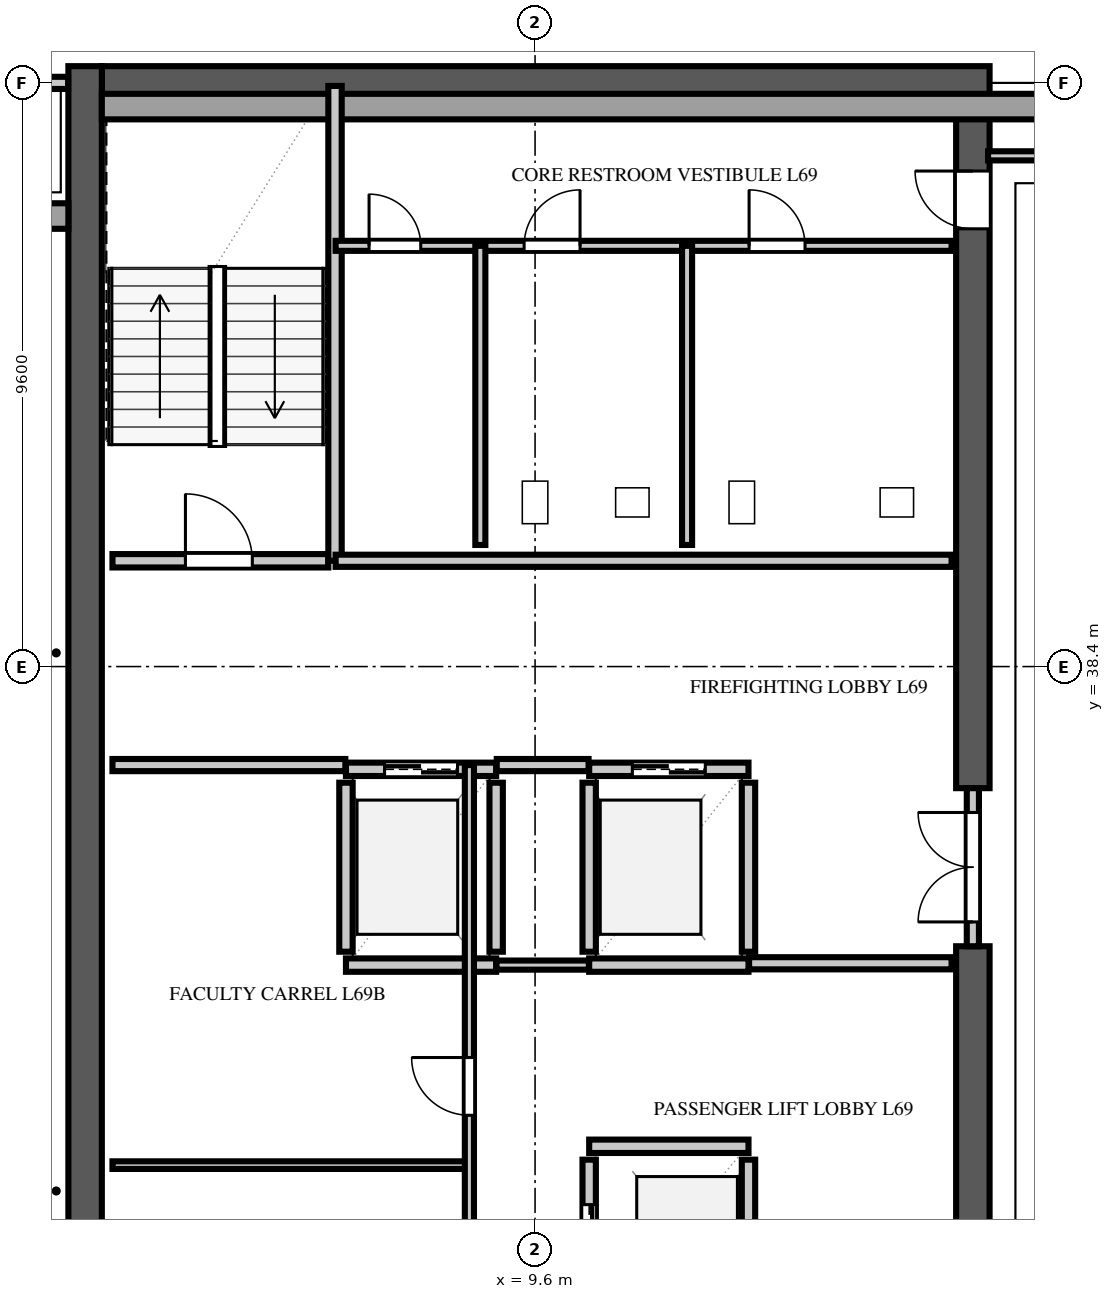
"""IFC4 building model, lengths in metres.
Left out: names, types, materials, properties, quantities, classifications, styles, units other than length and angle.
Written with IfcOpenShell. Run it as: python <this file> out.ifc"""

import sys

from ifc_helpers import new_model, si_unit, direction, frame, frame_2d, origin, place, context, subcontext, project, spatial, rectangle, extrude, element, fill, save


model = new_model("IFC4")
c1 = context("Model", 3, precision=1e-05, world=origin(), true_north=direction((0.0, 1.0)))
c2 = subcontext(c1, "Body", "Model", "MODEL_VIEW")
j1 = project(units=[si_unit("LENGTHUNIT", "METRE"), si_unit("PLANEANGLEUNIT", "RADIAN")], contexts=[c1])
p1 = place(None, origin())
s1 = spatial("IfcSite", under=j1, at=p1, CompositionType="ELEMENT")
p2 = place(p1, origin())
s2 = spatial("IfcBuilding", under=s1, at=p2, CompositionType="ELEMENT")
p3 = place(p2, frame((0.0, 0.0, 273.4)))
s3 = spatial("IfcBuildingStorey", under=s2, at=p3, CompositionType="ELEMENT", Elevation=273.4)
p4 = place(p3, frame((2.475, 48.0, 0.0), z_axis=(0.0, 0.0, 1.0), x_axis=(1.0, 0.0, 0.0)))
e1 = element("IfcWall", 1, at=p4, inside=s3, PredefinedType="SHEAR", context=c2, shape_type="SweptSolid", body=[
    extrude(rectangle(XDim=14.6, YDim=0.55, at=frame_2d((7.3, 0.0))), origin(), (0.0, 0.0, 1.0), 3.54),
])
p5 = place(p3, frame((2.2, 9.325, 0.0), z_axis=(0.0, 0.0, 1.0), x_axis=(0.0, 1.0, 0.0)))
e2 = element("IfcWall", 2, at=p5, inside=s3, PredefinedType="SHEAR", context=c2, shape_type="SweptSolid", body=[
    extrude(rectangle(XDim=38.95, YDim=0.55, at=frame_2d((19.475, 0.0))), origin(), (0.0, 0.0, 1.0), 3.54),
])
p6 = place(p3, frame((16.8, 26.0, 0.0), z_axis=(0.0, 0.0, 1.0), x_axis=(0.0, 1.0, 0.0)))
e3 = element("IfcWall", 3, at=p6, inside=s3, PredefinedType="SHEAR", context=c2, shape_type="SweptSolid", body=[
    extrude(rectangle(XDim=7.8, YDim=0.55, at=frame_2d((3.9, 0.0))), origin(), (0.0, 0.0, 1.0), 3.54),
])
p7 = place(p3, frame((16.8, 36.4, 0.0), z_axis=(0.0, 0.0, 1.0), x_axis=(0.0, 1.0, 0.0)))
e4 = element("IfcWall", 4, at=p7, inside=s3, PredefinedType="SHEAR", context=c2, shape_type="SweptSolid", body=[
    extrude(rectangle(XDim=11.325, YDim=0.55, at=frame_2d((5.663, 0.0))), origin(), (0.0, 0.0, 1.0), 3.54),
])
p8 = place(p7, frame((9.2, 0.0, 0.0)))
e5 = element("IfcOpeningElement", 5, at=p8, cuts=e4, PredefinedType="OPENING", context=c2, shape_type="SweptSolid", body=[
    extrude(rectangle(XDim=0.95, YDim=2.15, at=frame_2d((0.475, 1.075))), frame((0.0, 0.287, 0.0), z_axis=(0.0, -1.0, 0.0), x_axis=(1.0, 0.0, 0.0)), (0.0, 0.0, 1.0), 0.574),
])
p9 = place(p3, frame((36.56, 47.61, 0.0), z_axis=(0.0, 0.0, 1.0), x_axis=(-1.0, 0.0, 0.0)))
e6 = element("IfcWall", 6, at=p9, inside=s3, PredefinedType="SOLIDWALL", context=c2, shape_type="SweptSolid", body=[
    extrude(rectangle(XDim=34.085, YDim=0.42, at=frame_2d((17.042, 0.0))), origin(), (0.0, 0.0, 1.0), 3.54),
])
p10 = place(p9, frame((4.885, 0.0, 0.9)))
e7 = element("IfcOpeningElement", 7, at=p10, cuts=e6, PredefinedType="OPENING", context=c2, shape_type="SweptSolid", body=[
    extrude(rectangle(XDim=0.95, YDim=1.85, at=frame_2d((0.475, 0.925))), frame((0.0, 0.222, 0.0), z_axis=(0.0, -1.0, 0.0), x_axis=(1.0, 0.0, 0.0)), (0.0, 0.0, 1.0), 0.444),
])
p11 = place(p9, frame((9.41, 0.0, 0.9)))
e8 = element("IfcOpeningElement", 8, at=p11, cuts=e6, PredefinedType="OPENING", context=c2, shape_type="SweptSolid", body=[
    extrude(rectangle(XDim=1.5, YDim=1.85, at=frame_2d((0.75, 0.925))), frame((0.0, 0.222, 0.0), z_axis=(0.0, -1.0, 0.0), x_axis=(1.0, 0.0, 0.0)), (0.0, 0.0, 1.0), 0.444),
])
p12 = place(p9, frame((14.485, 0.0, 0.9)))
e9 = element("IfcOpeningElement", 9, at=p12, cuts=e6, PredefinedType="OPENING", context=c2, shape_type="SweptSolid", body=[
    extrude(rectangle(XDim=0.95, YDim=1.85, at=frame_2d((0.475, 0.925))), frame((0.0, 0.222, 0.0), z_axis=(0.0, -1.0, 0.0), x_axis=(1.0, 0.0, 0.0)), (0.0, 0.0, 1.0), 0.444),
])
p13 = place(p3, frame((1.925, 45.81, 0.0), z_axis=(0.0, 0.0, 1.0), x_axis=(-1.0, 0.0, 0.0)))
e10 = element("IfcWall", 10, at=p13, inside=s3, PredefinedType="SOLIDWALL", context=c2, shape_type="SweptSolid", body=[
    extrude(rectangle(XDim=1.885, YDim=0.42, at=frame_2d((0.942, 0.0))), origin(), (0.0, 0.0, 1.0), 3.54),
])
p14 = place(p3, frame((2.65, 40.14, 0.0), z_axis=(0.0, 0.0, 1.0), x_axis=(1.0, 0.0, 0.0)))
e11 = element("IfcWall", 11, at=p14, inside=s3, PredefinedType="SOLIDWALL", context=c2, shape_type="SweptSolid", body=[
    extrude(rectangle(XDim=3.55, YDim=0.22, at=frame_2d((1.775, 0.0))), origin(), (0.0, 0.0, 1.0), 3.54),
])
p15 = place(p14, frame((1.2, 0.0, 0.0)))
e12 = element("IfcOpeningElement", 12, at=p15, cuts=e11, PredefinedType="OPENING", context=c2, shape_type="SweptSolid", body=[
    extrude(rectangle(XDim=1.1, YDim=2.2, at=frame_2d((0.55, 1.1))), frame((0.0, 0.122, 0.0), z_axis=(0.0, -1.0, 0.0), x_axis=(1.0, 0.0, 0.0)), (0.0, 0.0, 1.0), 0.244),
])
p16 = place(p3, frame((6.31, 40.14, 0.0), z_axis=(0.0, 0.0, 1.0), x_axis=(0.0, 1.0, 0.0)))
e13 = element("IfcWall", 13, at=p16, inside=s3, PredefinedType="SOLIDWALL", context=c2, shape_type="SweptSolid", body=[
    extrude(rectangle(XDim=7.81, YDim=0.22, at=frame_2d((3.905, 0.0))), origin(), (0.0, 0.0, 1.0), 3.54),
])
p17 = place(p3, frame((10.49, 27.71, 0.0), z_axis=(0.0, 0.0, 1.0), x_axis=(0.0, 1.0, 0.0)))
e14 = element("IfcWall", 14, at=p17, inside=s3, PredefinedType="SOLIDWALL", context=c2, shape_type="SweptSolid", body=[
    extrude(rectangle(XDim=2.58, YDim=0.22, at=frame_2d((1.29, 0.0))), origin(), (0.0, 0.0, 1.0), 3.54),
])
p18 = place(p17, frame((0.74, 0.0, 0.0)))
e15 = element("IfcOpeningElement", 15, at=p18, cuts=e14, PredefinedType="OPENING", context=c2, shape_type="SweptSolid", body=[
    extrude(rectangle(XDim=1.1, YDim=2.2, at=frame_2d((0.55, 1.1))), frame((0.0, 0.122, 0.0), z_axis=(0.0, -1.0, 0.0), x_axis=(1.0, 0.0, 0.0)), (0.0, 0.0, 1.0), 0.244),
])
p19 = place(p3, frame((13.11, 27.71, 0.0), z_axis=(0.0, 0.0, 1.0), x_axis=(0.0, 1.0, 0.0)))
e16 = element("IfcWall", 16, at=p19, inside=s3, PredefinedType="SOLIDWALL", context=c2, shape_type="SweptSolid", body=[
    extrude(rectangle(XDim=2.58, YDim=0.22, at=frame_2d((1.29, 0.0))), origin(), (0.0, 0.0, 1.0), 3.54),
])
p20 = place(p3, frame((10.49, 30.51, 0.0), z_axis=(0.0, 0.0, 1.0), x_axis=(1.0, 0.0, 0.0)))
e17 = element("IfcWall", 17, at=p20, inside=s3, PredefinedType="SOLIDWALL", context=c2, shape_type="SweptSolid", body=[
    extrude(rectangle(XDim=2.62, YDim=0.22, at=frame_2d((1.31, 0.0))), origin(), (0.0, 0.0, 1.0), 3.54),
])
for number, where, z_axis, x_axis in (
    (18, (6.49, 33.71, 0.0), (0.0, 0.0, 1.0), (0.0, 1.0, 0.0)),
    (19, (8.96, 33.71, 0.0), (0.0, 0.0, 1.0), (0.0, 1.0, 0.0)),
):
    element("IfcWall", number, at=place(p3, frame(where, z_axis=z_axis, x_axis=x_axis)), inside=s3, PredefinedType="SOLIDWALL", context=c2, shape_type="SweptSolid", body=[
        extrude(rectangle(XDim=2.78, YDim=0.22, at=frame_2d((1.39, 0.0))), origin(), (0.0, 0.0, 1.0), 3.54),
    ])
p21 = place(p3, frame((6.49, 33.49, 0.0), z_axis=(0.0, 0.0, 1.0), x_axis=(1.0, 0.0, 0.0)))
e20 = element("IfcWall", 20, at=p21, inside=s3, PredefinedType="SOLIDWALL", context=c2, shape_type="SweptSolid", body=[
    extrude(rectangle(XDim=2.47, YDim=0.22, at=frame_2d((1.235, 0.0))), origin(), (0.0, 0.0, 1.0), 3.54),
])
p22 = place(p3, frame((6.49, 36.71, 0.0), z_axis=(0.0, 0.0, 1.0), x_axis=(1.0, 0.0, 0.0)))
e21 = element("IfcWall", 21, at=p22, inside=s3, PredefinedType="SOLIDWALL", context=c2, shape_type="SweptSolid", body=[
    extrude(rectangle(XDim=2.47, YDim=0.22, at=frame_2d((1.235, 0.0))), origin(), (0.0, 0.0, 1.0), 3.54),
])
p23 = place(p22, frame((0.635, 0.0, 0.0)))
e22 = element("IfcOpeningElement", 22, at=p23, cuts=e21, PredefinedType="OPENING", context=c2, shape_type="SweptSolid", body=[
    extrude(rectangle(XDim=1.2, YDim=2.2, at=frame_2d((0.6, 1.1))), frame((0.0, 0.122, 0.0), z_axis=(0.0, -1.0, 0.0), x_axis=(1.0, 0.0, 0.0)), (0.0, 0.0, 1.0), 0.244),
])
for number, where, z_axis, x_axis in (
    (23, (10.49, 33.71, 0.0), (0.0, 0.0, 1.0), (0.0, 1.0, 0.0)),
    (24, (13.11, 33.71, 0.0), (0.0, 0.0, 1.0), (0.0, 1.0, 0.0)),
):
    element("IfcWall", number, at=place(p3, frame(where, z_axis=z_axis, x_axis=x_axis)), inside=s3, PredefinedType="SOLIDWALL", context=c2, shape_type="SweptSolid", body=[
        extrude(rectangle(XDim=2.78, YDim=0.22, at=frame_2d((1.39, 0.0))), origin(), (0.0, 0.0, 1.0), 3.54),
    ])
p24 = place(p3, frame((10.49, 33.49, 0.0), z_axis=(0.0, 0.0, 1.0), x_axis=(1.0, 0.0, 0.0)))
e25 = element("IfcWall", 25, at=p24, inside=s3, PredefinedType="SOLIDWALL", context=c2, shape_type="SweptSolid", body=[
    extrude(rectangle(XDim=2.62, YDim=0.22, at=frame_2d((1.31, 0.0))), origin(), (0.0, 0.0, 1.0), 3.54),
])
p25 = place(p3, frame((10.49, 36.71, 0.0), z_axis=(0.0, 0.0, 1.0), x_axis=(1.0, 0.0, 0.0)))
e26 = element("IfcWall", 26, at=p25, inside=s3, PredefinedType="SOLIDWALL", context=c2, shape_type="SweptSolid", body=[
    extrude(rectangle(XDim=2.62, YDim=0.22, at=frame_2d((1.31, 0.0))), origin(), (0.0, 0.0, 1.0), 3.54),
])
p26 = place(p25, frame((0.71, 0.0, 0.0)))
e27 = element("IfcOpeningElement", 27, at=p26, cuts=e26, PredefinedType="OPENING", context=c2, shape_type="SweptSolid", body=[
    extrude(rectangle(XDim=1.2, YDim=2.2, at=frame_2d((0.6, 1.1))), frame((0.0, 0.122, 0.0), z_axis=(0.0, -1.0, 0.0), x_axis=(1.0, 0.0, 0.0)), (0.0, 0.0, 1.0), 0.244),
])
p27 = place(p3, frame((2.65, 36.78, 0.0), z_axis=(0.0, 0.0, 1.0), x_axis=(1.0, 0.0, 0.0)))
e28 = element("IfcWall", 28, at=p27, inside=s3, PredefinedType="SOLIDWALL", context=c2, shape_type="SweptSolid", body=[
    extrude(rectangle(XDim=3.83, YDim=0.2, at=frame_2d((1.915, 0.0))), origin(), (0.0, 0.0, 1.0), 3.54),
])
p28 = place(p3, frame((8.97, 36.78, 0.0), z_axis=(0.0, 0.0, 1.0), x_axis=(1.0, 0.0, 0.0)))
e29 = element("IfcWall", 29, at=p28, inside=s3, PredefinedType="SOLIDWALL", context=c2, shape_type="SweptSolid", body=[
    extrude(rectangle(XDim=1.51, YDim=0.2, at=frame_2d((0.755, 0.0))), origin(), (0.0, 0.0, 1.0), 3.54),
])
p29 = place(p3, frame((13.12, 33.52, 0.0), z_axis=(0.0, 0.0, 1.0), x_axis=(1.0, 0.0, 0.0)))
e30 = element("IfcWall", 30, at=p29, inside=s3, PredefinedType="SOLIDWALL", context=c2, shape_type="SweptSolid", body=[
    extrude(rectangle(XDim=3.33, YDim=0.2, at=frame_2d((1.665, 0.0))), origin(), (0.0, 0.0, 1.0), 3.54),
])
p30 = place(p3, frame((6.32, 40.14, 0.0), z_axis=(0.0, 0.0, 1.0), x_axis=(1.0, 0.0, 0.0)))
e31 = element("IfcWall", 31, at=p30, inside=s3, PredefinedType="SOLIDWALL", context=c2, shape_type="SweptSolid", body=[
    extrude(rectangle(XDim=10.13, YDim=0.2, at=frame_2d((5.065, 0.0))), origin(), (0.0, 0.0, 1.0), 3.54),
])
p31 = place(p3, frame((16.8, 33.8, 0.0), z_axis=(0.0, 0.0, 1.0), x_axis=(0.0, 1.0, 0.0)))
e32 = element("IfcWall", 32, at=p31, inside=s3, PredefinedType="SOLIDWALL", context=c2, shape_type="SweptSolid", body=[
    extrude(rectangle(XDim=2.6, YDim=0.2, at=frame_2d((1.3, 0.0))), origin(), (0.0, 0.0, 1.0), 3.54),
])
p32 = place(p31, frame((0.4, 0.0, 0.0)))
e33 = element("IfcOpeningElement", 33, at=p32, cuts=e32, PredefinedType="OPENING", context=c2, shape_type="SweptSolid", body=[
    extrude(rectangle(XDim=1.8, YDim=2.2, at=frame_2d((0.9, 1.1))), frame((0.0, 0.112, 0.0), z_axis=(0.0, -1.0, 0.0), x_axis=(1.0, 0.0, 0.0)), (0.0, 0.0, 1.0), 0.224),
])
p33 = place(p3, frame((8.965, 33.49, 0.0), z_axis=(0.0, 0.0, 1.0), x_axis=(1.0, 0.0, 0.0)))
e34 = element("IfcWall", 34, at=p33, inside=s3, PredefinedType="PARTITIONING", context=c2, shape_type="SweptSolid", body=[
    extrude(rectangle(XDim=1.52, YDim=0.15, at=frame_2d((0.76, 0.0))), origin(), (0.0, 0.0, 1.0), 3.54),
])
p34 = place(p3, frame((2.65, 30.2, 0.0), z_axis=(0.0, 0.0, 1.0), x_axis=(1.0, 0.0, 0.0)))
e35 = element("IfcWall", 35, at=p34, inside=s3, PredefinedType="PARTITIONING", context=c2, shape_type="SweptSolid", body=[
    extrude(rectangle(XDim=5.87, YDim=0.125, at=frame_2d((2.935, 0.0))), origin(), (0.0, 0.0, 1.0), 3.54),
])
p35 = place(p3, frame((8.52, 12.02, 0.0), z_axis=(0.0, 0.0, 1.0), x_axis=(0.0, 1.0, 0.0)))
e36 = element("IfcWall", 36, at=p35, inside=s3, PredefinedType="PARTITIONING", context=c2, shape_type="SweptSolid", body=[
    extrude(rectangle(XDim=24.76, YDim=0.15, at=frame_2d((12.38, 0.0))), origin(), (0.0, 0.0, 1.0), 3.54),
])
p36 = place(p35, frame((8.0, 0.0, 0.0)))
e37 = element("IfcOpeningElement", 37, at=p36, cuts=e36, PredefinedType="OPENING", context=c2, shape_type="SweptSolid", body=[
    extrude(rectangle(XDim=0.95, YDim=2.15, at=frame_2d((0.475, 1.075))), frame((0.0, 0.087, 0.0), z_axis=(0.0, -1.0, 0.0), x_axis=(1.0, 0.0, 0.0)), (0.0, 0.0, 1.0), 0.174),
])
p37 = place(p35, frame((19.0, 0.0, 0.0)))
e38 = element("IfcOpeningElement", 38, at=p37, cuts=e36, PredefinedType="OPENING", context=c2, shape_type="SweptSolid", body=[
    extrude(rectangle(XDim=0.95, YDim=2.15, at=frame_2d((0.475, 1.075))), frame((0.0, 0.087, 0.0), z_axis=(0.0, -1.0, 0.0), x_axis=(1.0, 0.0, 0.0)), (0.0, 0.0, 1.0), 0.174),
])
p38 = place(p3, frame((6.32, 45.32, 0.0), z_axis=(0.0, 0.0, 1.0), x_axis=(1.0, 0.0, 0.0)))
e39 = element("IfcWall", 39, at=p38, inside=s3, PredefinedType="PLUMBINGWALL", context=c2, shape_type="SweptSolid", body=[
    extrude(rectangle(XDim=10.13, YDim=0.165, at=frame_2d((5.065, 0.0))), origin(), (0.0, 0.0, 1.0), 3.54),
])
p39 = place(p38, frame((0.55, 0.0, 0.0)))
e40 = element("IfcOpeningElement", 40, at=p39, cuts=e39, PredefinedType="OPENING", context=c2, shape_type="SweptSolid", body=[
    extrude(rectangle(XDim=0.85, YDim=2.1, at=frame_2d((0.425, 1.05))), frame((0.0, 0.094, 0.0), z_axis=(0.0, -1.0, 0.0), x_axis=(1.0, 0.0, 0.0)), (0.0, 0.0, 1.0), 0.189),
])
p40 = place(p38, frame((3.1, 0.0, 0.0)))
e41 = element("IfcOpeningElement", 41, at=p40, cuts=e39, PredefinedType="OPENING", context=c2, shape_type="SweptSolid", body=[
    extrude(rectangle(XDim=0.92, YDim=2.15, at=frame_2d((0.46, 1.075))), frame((0.0, 0.094, 0.0), z_axis=(0.0, -1.0, 0.0), x_axis=(1.0, 0.0, 0.0)), (0.0, 0.0, 1.0), 0.189),
])
p41 = place(p38, frame((6.8, 0.0, 0.0)))
e42 = element("IfcOpeningElement", 42, at=p41, cuts=e39, PredefinedType="OPENING", context=c2, shape_type="SweptSolid", body=[
    extrude(rectangle(XDim=0.92, YDim=2.15, at=frame_2d((0.46, 1.075))), frame((0.0, 0.094, 0.0), z_axis=(0.0, -1.0, 0.0), x_axis=(1.0, 0.0, 0.0)), (0.0, 0.0, 1.0), 0.189),
])
for number, where, z_axis, x_axis in (
    (43, (8.7, 40.4, 0.0), (0.0, 0.0, 1.0), (0.0, 1.0, 0.0)),
    (44, (12.1, 40.4, 0.0), (0.0, 0.0, 1.0), (0.0, 1.0, 0.0)),
):
    element("IfcWall", number, at=place(p3, frame(where, z_axis=z_axis, x_axis=x_axis)), inside=s3, PredefinedType="PLUMBINGWALL", context=c2, shape_type="SweptSolid", body=[
        extrude(rectangle(XDim=4.92, YDim=0.165, at=frame_2d((2.46, 0.0))), origin(), (0.0, 0.0, 1.0), 3.54),
    ])
p42 = place(p3, frame((0.85, 48.0, 0.0), z_axis=(0.0, 0.0, 1.0), x_axis=(1.0, 0.0, 0.0)))
e45 = element("IfcWall", 45, at=p42, inside=s3, PredefinedType="SOLIDWALL", context=c2, shape_type="SweptSolid", body=[
    extrude(rectangle(XDim=1.07, YDim=0.2, at=frame_2d((0.535, 0.0))), origin(), (0.0, 0.0, 1.0), 3.54),
])
p43 = place(p3, frame((17.05, 46.8, 0.0), z_axis=(0.0, 0.0, 1.0), x_axis=(1.0, 0.0, 0.0)))
e46 = element("IfcWall", 46, at=p43, inside=s3, PredefinedType="PARTITIONING", context=c2, shape_type="SweptSolid", body=[
    extrude(rectangle(XDim=2.15, YDim=0.15, at=frame_2d((1.075, 0.0))), origin(), (0.0, 0.0, 1.0), 3.54),
])
p44 = place(p15, origin())
e47 = element("IfcDoor", 47, at=p44, inside=s3, OperationType="SINGLE_SWING_LEFT", PredefinedType="DOOR", context=c2, shape_type="SweptSolid", body=[
    extrude(rectangle(XDim=1.1, YDim=2.2, at=frame_2d((0.55, 1.1))), frame((0.0, 0.025, 0.0), z_axis=(0.0, -1.0, 0.0), x_axis=(1.0, 0.0, 0.0)), (0.0, 0.0, 1.0), 0.05),
])
fill(e12, e47)
p45 = place(p18, origin())
e48 = element("IfcDoor", 48, at=p45, inside=s3, OperationType="DOUBLE_DOOR_SLIDING", PredefinedType="DOOR", context=c2, shape_type="SweptSolid", body=[
    extrude(rectangle(XDim=1.1, YDim=2.2, at=frame_2d((0.55, 1.1))), frame((0.0, 0.025, 0.0), z_axis=(0.0, -1.0, 0.0), x_axis=(1.0, 0.0, 0.0)), (0.0, 0.0, 1.0), 0.05),
])
fill(e15, e48)
p46 = place(p23, origin())
e49 = element("IfcDoor", 49, at=p46, inside=s3, OperationType="DOUBLE_DOOR_SLIDING", PredefinedType="DOOR", context=c2, shape_type="SweptSolid", body=[
    extrude(rectangle(XDim=1.2, YDim=2.2, at=frame_2d((0.6, 1.1))), frame((0.0, 0.025, 0.0), z_axis=(0.0, -1.0, 0.0), x_axis=(1.0, 0.0, 0.0)), (0.0, 0.0, 1.0), 0.05),
])
fill(e22, e49)
p47 = place(p26, origin())
e50 = element("IfcDoor", 50, at=p47, inside=s3, OperationType="DOUBLE_DOOR_SLIDING", PredefinedType="DOOR", context=c2, shape_type="SweptSolid", body=[
    extrude(rectangle(XDim=1.2, YDim=2.2, at=frame_2d((0.6, 1.1))), frame((0.0, 0.025, 0.0), z_axis=(0.0, -1.0, 0.0), x_axis=(1.0, 0.0, 0.0)), (0.0, 0.0, 1.0), 0.05),
])
fill(e27, e50)
p48 = place(p8, origin())
e51 = element("IfcDoor", 51, at=p48, inside=s3, OperationType="SINGLE_SWING_RIGHT", PredefinedType="DOOR", context=c2, shape_type="SweptSolid", body=[
    extrude(rectangle(XDim=0.95, YDim=2.15, at=frame_2d((0.475, 1.075))), frame((0.0, 0.025, 0.0), z_axis=(0.0, -1.0, 0.0), x_axis=(1.0, 0.0, 0.0)), (0.0, 0.0, 1.0), 0.05),
])
fill(e5, e51)
p49 = place(p32, origin())
e52 = element("IfcDoor", 52, at=p49, inside=s3, OperationType="DOUBLE_DOOR_SINGLE_SWING", PredefinedType="DOOR", context=c2, shape_type="SweptSolid", body=[
    extrude(rectangle(XDim=1.8, YDim=2.2, at=frame_2d((0.9, 1.1))), frame((0.0, 0.025, 0.0), z_axis=(0.0, -1.0, 0.0), x_axis=(1.0, 0.0, 0.0)), (0.0, 0.0, 1.0), 0.05),
])
fill(e33, e52)
p50 = place(p37, origin())
e53 = element("IfcDoor", 53, at=p50, inside=s3, OperationType="SINGLE_SWING_RIGHT", PredefinedType="DOOR", context=c2, shape_type="SweptSolid", body=[
    extrude(rectangle(XDim=0.95, YDim=2.15, at=frame_2d((0.475, 1.075))), frame((0.0, 0.025, 0.0), z_axis=(0.0, -1.0, 0.0), x_axis=(1.0, 0.0, 0.0)), (0.0, 0.0, 1.0), 0.05),
])
fill(e38, e53)
p51 = place(p39, origin())
e54 = element("IfcDoor", 54, at=p51, inside=s3, OperationType="SINGLE_SWING_LEFT", PredefinedType="DOOR", context=c2, shape_type="SweptSolid", body=[
    extrude(rectangle(XDim=0.85, YDim=2.1, at=frame_2d((0.425, 1.05))), frame((0.0, 0.025, 0.0), z_axis=(0.0, -1.0, 0.0), x_axis=(1.0, 0.0, 0.0)), (0.0, 0.0, 1.0), 0.05),
])
fill(e40, e54)
p52 = place(p40, origin())
e55 = element("IfcDoor", 55, at=p52, inside=s3, OperationType="SINGLE_SWING_RIGHT", PredefinedType="DOOR", context=c2, shape_type="SweptSolid", body=[
    extrude(rectangle(XDim=0.92, YDim=2.15, at=frame_2d((0.46, 1.075))), frame((0.0, 0.025, 0.0), z_axis=(0.0, -1.0, 0.0), x_axis=(1.0, 0.0, 0.0)), (0.0, 0.0, 1.0), 0.05),
])
fill(e41, e55)
p53 = place(p41, origin())
e56 = element("IfcDoor", 56, at=p53, inside=s3, OperationType="SINGLE_SWING_LEFT", PredefinedType="DOOR", context=c2, shape_type="SweptSolid", body=[
    extrude(rectangle(XDim=0.92, YDim=2.15, at=frame_2d((0.46, 1.075))), frame((0.0, 0.025, 0.0), z_axis=(0.0, -1.0, 0.0), x_axis=(1.0, 0.0, 0.0)), (0.0, 0.0, 1.0), 0.05),
])
fill(e42, e56)
save(model, sys.argv[1])
